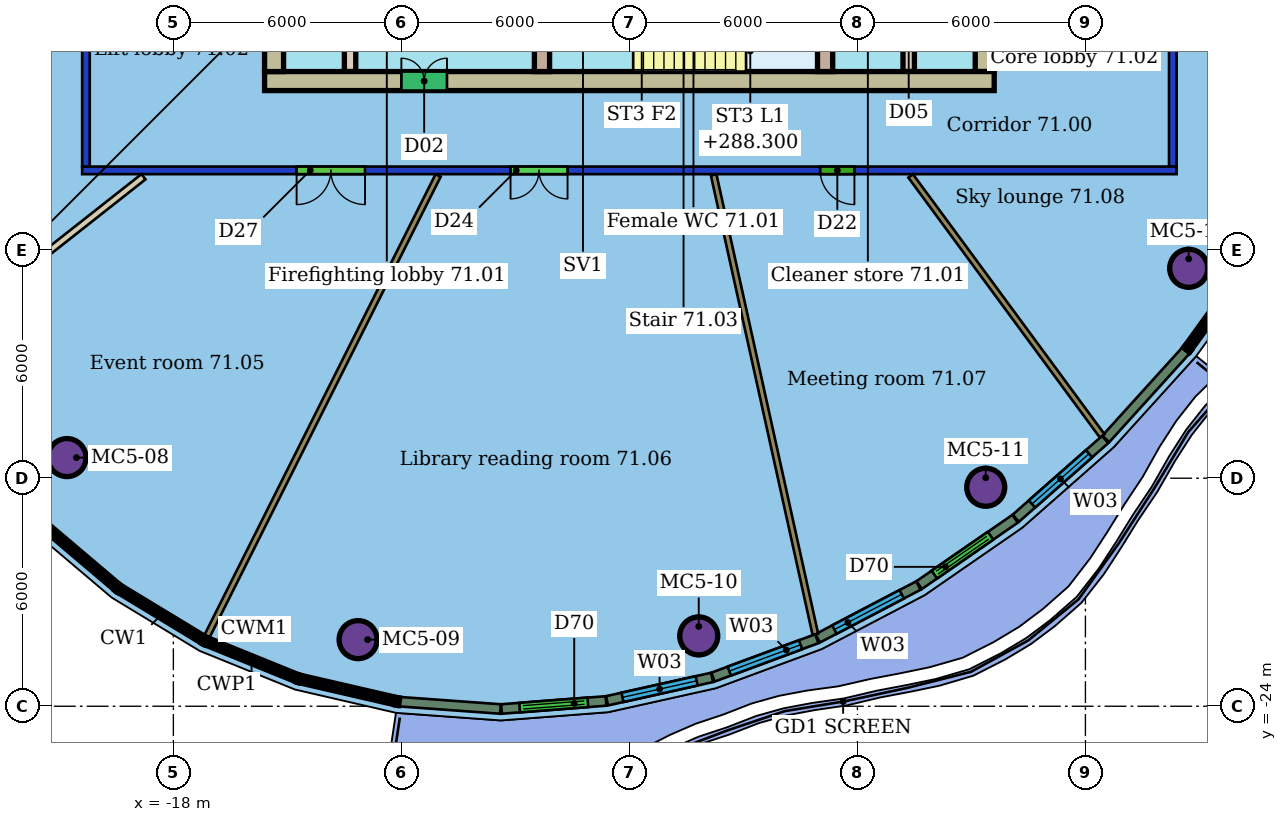
"""IFC4 building model, lengths in metres.
Left out: names, types, materials, properties, quantities, classifications, styles, units other than length and angle.
Written with IfcOpenShell. Run it as: python <this file> out.ifc"""

import sys

from ifc_helpers import new_model, si_unit, direction, frame, frame_2d, origin, origin_2d, place, context, subcontext, project, spatial, rectangle, hollow_circle, extrude, element, fill, save


model = new_model("IFC4")
c1 = context("Model", 3, precision=1e-05, world=origin(), true_north=direction((0.0, 1.0)))
c2 = subcontext(c1, "Body", "Model", "MODEL_VIEW")
j1 = project(units=[si_unit("LENGTHUNIT", "METRE"), si_unit("PLANEANGLEUNIT", "RADIAN")], contexts=[c1])
p1 = place(None, origin())
s1 = spatial("IfcSite", under=j1, at=p1, CompositionType="ELEMENT")
p2 = place(p1, origin())
s2 = spatial("IfcBuilding", under=s1, at=p2, CompositionType="ELEMENT")
p3 = place(p2, frame((0.0, 0.0, 286.5)))
s3 = spatial("IfcBuildingStorey", under=s2, at=p3, CompositionType="ELEMENT", Elevation=286.5)
for number, where, z_axis, x_axis in (
    (1, (-20.8, -17.457, 0.0), (0.0, 0.0, 1.0), (1.0, 0.0, 0.0)),
    (2, (-13.138, -22.247, 0.0), (0.0, 0.0, 1.0), (1.0, 0.0, 0.0)),
    (3, (-4.175, -22.149, 0.0), (0.0, 0.0, 1.0), (1.0, 0.0, 0.0)),
    (4, (3.377, -18.238, 0.0), (0.0, 0.0, 1.0), (1.0, 0.0, 0.0)),
    (5, (8.718, -12.477, 0.0), (0.0, 0.0, 1.0), (1.0, 0.0, 0.0)),
):
    element("IfcColumn", number, at=place(p3, frame(where, z_axis=z_axis, x_axis=x_axis)), inside=s3, PredefinedType="COLUMN", context=c2, shape_type="SweptSolid", body=[
        extrude(hollow_circle(Radius=0.5, WallThickness=0.04, at=origin_2d()), origin(), (0.0, 0.0, 1.0), 3.45),
    ])
p4 = place(p3, frame((8.4, -9.9, 0.0), z_axis=(0.0, 0.0, 1.0), x_axis=(-1.0, 0.0, 0.0)))
e6 = element("IfcWall", 6, at=p4, inside=s3, PredefinedType="PARTITIONING", context=c2, shape_type="SweptSolid", body=[
    extrude(rectangle(XDim=28.8, YDim=0.2, at=frame_2d((14.4, 0.0))), origin(), (0.0, 0.0, 1.0), 3.1),
])
p5 = place(p4, frame((21.356, 0.0, 0.0)))
e7 = element("IfcOpeningElement", 7, at=p5, cuts=e6, PredefinedType="OPENING", context=c2, shape_type="SweptSolid", body=[
    extrude(rectangle(XDim=1.8, YDim=2.4, at=frame_2d((0.9, 1.2))), frame((0.0, 0.11, 0.0), z_axis=(0.0, -1.0, 0.0), x_axis=(1.0, 0.0, 0.0)), (0.0, 0.0, 1.0), 0.22),
])
p6 = place(p4, frame((16.027, 0.0, 0.0)))
e8 = element("IfcOpeningElement", 8, at=p6, cuts=e6, PredefinedType="OPENING", context=c2, shape_type="SweptSolid", body=[
    extrude(rectangle(XDim=1.5, YDim=2.1, at=frame_2d((0.75, 1.05))), frame((0.0, 0.11, 0.0), z_axis=(0.0, -1.0, 0.0), x_axis=(1.0, 0.0, 0.0)), (0.0, 0.0, 1.0), 0.22),
])
p7 = place(p4, frame((8.479, 0.0, 0.0)))
e9 = element("IfcOpeningElement", 9, at=p7, cuts=e6, PredefinedType="OPENING", context=c2, shape_type="SweptSolid", body=[
    extrude(rectangle(XDim=0.9, YDim=2.1, at=frame_2d((0.45, 1.05))), frame((0.0, 0.11, 0.0), z_axis=(0.0, -1.0, 0.0), x_axis=(1.0, 0.0, 0.0)), (0.0, 0.0, 1.0), 0.22),
])
p8 = place(p3, frame((-20.3, -9.8, 0.0), z_axis=(0.0, 0.0, 1.0), x_axis=(0.0, 1.0, 0.0)))
e10 = element("IfcWall", 10, at=p8, inside=s3, PredefinedType="PARTITIONING", context=c2, shape_type="SweptSolid", body=[
    extrude(rectangle(XDim=19.6, YDim=0.2, at=frame_2d((9.8, 0.0))), origin(), (0.0, 0.0, 1.0), 3.1),
])
p9 = place(p8, frame((8.643, 0.0, 0.0)))
e11 = element("IfcOpeningElement", 11, at=p9, cuts=e10, PredefinedType="OPENING", context=c2, shape_type="SweptSolid", body=[
    extrude(rectangle(XDim=1.5, YDim=2.1, at=frame_2d((0.75, 1.05))), frame((0.0, 0.11, 0.0), z_axis=(0.0, -1.0, 0.0), x_axis=(1.0, 0.0, 0.0)), (0.0, 0.0, 1.0), 0.22),
])
p10 = place(p8, frame((4.379, 0.0, 0.0)))
e12 = element("IfcOpeningElement", 12, at=p10, cuts=e10, PredefinedType="OPENING", context=c2, shape_type="SweptSolid", body=[
    extrude(rectangle(XDim=1.0, YDim=2.1, at=frame_2d((0.5, 1.05))), frame((0.0, 0.11, 0.0), z_axis=(0.0, -1.0, 0.0), x_axis=(1.0, 0.0, 0.0)), (0.0, 0.0, 1.0), 0.22),
])
p11 = place(p3, frame((8.3, 9.8, 0.0), z_axis=(0.0, 0.0, 1.0), x_axis=(0.0, -1.0, 0.0)))
e13 = element("IfcWall", 13, at=p11, inside=s3, PredefinedType="PARTITIONING", context=c2, shape_type="SweptSolid", body=[
    extrude(rectangle(XDim=19.6, YDim=0.2, at=frame_2d((9.8, 0.0))), origin(), (0.0, 0.0, 1.0), 3.1),
])
p12 = place(p11, frame((14.011, 0.0, 0.0)))
e14 = element("IfcOpeningElement", 14, at=p12, cuts=e13, PredefinedType="OPENING", context=c2, shape_type="SweptSolid", body=[
    extrude(rectangle(XDim=1.5, YDim=2.1, at=frame_2d((0.75, 1.05))), frame((0.0, 0.11, 0.0), z_axis=(0.0, -1.0, 0.0), x_axis=(1.0, 0.0, 0.0)), (0.0, 0.0, 1.0), 0.22),
])
p13 = place(p11, frame((8.798, 0.0, 0.0)))
e15 = element("IfcOpeningElement", 15, at=p13, cuts=e13, PredefinedType="OPENING", context=c2, shape_type="SweptSolid", body=[
    extrude(rectangle(XDim=0.9, YDim=2.1, at=frame_2d((0.45, 1.05))), frame((0.0, 0.11, 0.0), z_axis=(0.0, -1.0, 0.0), x_axis=(1.0, 0.0, 0.0)), (0.0, 0.0, 1.0), 0.22),
])
p14 = place(p11, frame((5.084, 0.0, 0.0)))
e16 = element("IfcOpeningElement", 16, at=p14, cuts=e13, PredefinedType="OPENING", context=c2, shape_type="SweptSolid", body=[
    extrude(rectangle(XDim=1.5, YDim=2.4, at=frame_2d((0.75, 1.2))), frame((0.0, 0.11, 0.0), z_axis=(0.0, -1.0, 0.0), x_axis=(1.0, 0.0, 0.0)), (0.0, 0.0, 1.0), 0.22),
])
p15 = place(p11, frame((1.387, 0.0, 0.0)))
e17 = element("IfcOpeningElement", 17, at=p15, cuts=e13, PredefinedType="OPENING", context=c2, shape_type="SweptSolid", body=[
    extrude(rectangle(XDim=1.0, YDim=2.1, at=frame_2d((0.5, 1.05))), frame((0.0, 0.11, 0.0), z_axis=(0.0, -1.0, 0.0), x_axis=(1.0, 0.0, 0.0)), (0.0, 0.0, 1.0), 0.22),
])
p16 = place(p3, frame((-24.656, -14.689, 0.0), z_axis=(0.0, 0.0, 1.0), x_axis=(0.785692916709, 0.618616715449, 0.0)))
e18 = element("IfcWall", 18, at=p16, inside=s3, PredefinedType="PARTITIONING", context=c2, shape_type="SweptSolid", body=[
    extrude(rectangle(XDim=7.469, YDim=0.175, at=frame_2d((3.734, 0.0))), origin(), (0.0, 0.0, 1.0), 3.45),
])
p17 = place(p3, frame((-17.118, -22.163, 0.0), z_axis=(0.0, 0.0, 1.0), x_axis=(0.448386215015, 0.893839919776, 0.0)))
e19 = element("IfcWall", 19, at=p17, inside=s3, PredefinedType="PARTITIONING", context=c2, shape_type="SweptSolid", body=[
    extrude(rectangle(XDim=13.57, YDim=0.15, at=frame_2d((6.785, 0.0))), origin(), (0.0, 0.0, 1.0), 3.45),
])
p18 = place(p3, frame((-1.107, -22.105, 0.0), z_axis=(0.0, 0.0, 1.0), x_axis=(-0.216130755643, 0.976364428103, 0.0)))
e20 = element("IfcWall", 20, at=p18, inside=s3, PredefinedType="PARTITIONING", context=c2, shape_type="SweptSolid", body=[
    extrude(rectangle(XDim=12.382, YDim=0.15, at=frame_2d((6.191, 0.0))), origin(), (0.0, 0.0, 1.0), 3.45),
])
p19 = place(p3, frame((6.441, -16.886, 0.0), z_axis=(0.0, 0.0, 1.0), x_axis=(-0.593147094441, 0.805094109006, 0.0)))
e21 = element("IfcWall", 21, at=p19, inside=s3, PredefinedType="PARTITIONING", context=c2, shape_type="SweptSolid", body=[
    extrude(rectangle(XDim=8.498, YDim=0.15, at=frame_2d((4.249, 0.0))), origin(), (0.0, 0.0, 1.0), 3.45),
])
p20 = place(p3, frame((-12.043, -23.881, 0.0), z_axis=(0.0, 0.0, 1.0), x_axis=(0.997395344453, -0.072128544025, 0.0)))
e22 = element("IfcWall", 22, at=p20, inside=s3, PredefinedType="SOLIDWALL", context=c2, shape_type="SweptSolid", body=[
    extrude(rectangle(XDim=2.657, YDim=0.25, at=frame_2d((1.329, 0.0))), origin(), (0.0, 0.0, 1.0), 3.15),
])
p21 = place(p3, frame((-9.366, -24.073, 0.0), z_axis=(0.0, 0.0, 1.0), x_axis=(0.997054485502, 0.076696498885, 0.0)))
e23 = element("IfcWall", 23, at=p21, inside=s3, PredefinedType="SOLIDWALL", context=c2, shape_type="SweptSolid", body=[
    extrude(rectangle(XDim=2.76, YDim=0.25, at=frame_2d((1.38, 0.0))), origin(), (0.0, 0.0, 1.0), 3.15),
])
p22 = place(p21, frame((0.48, 0.0, 0.0)))
e24 = element("IfcOpeningElement", 24, at=p22, cuts=e23, PredefinedType="OPENING", context=c2, shape_type="SweptSolid", body=[
    extrude(rectangle(XDim=1.8, YDim=2.4, at=frame_2d((0.9, 1.2))), frame((0.0, 0.135, 0.0), z_axis=(0.0, -1.0, 0.0), x_axis=(1.0, 0.0, 0.0)), (0.0, 0.0, 1.0), 0.27),
])
p23 = place(p3, frame((-6.589, -23.857, 0.0), z_axis=(0.0, 0.0, 1.0), x_axis=(0.976083550613, 0.217395727242, 0.0)))
e25 = element("IfcWall", 25, at=p23, inside=s3, PredefinedType="SOLIDWALL", context=c2, shape_type="SweptSolid", body=[
    extrude(rectangle(XDim=2.833, YDim=0.25, at=frame_2d((1.417, 0.0))), origin(), (0.0, 0.0, 1.0), 3.15),
])
p24 = place(p23, frame((0.417, 0.0, 0.9)))
e26 = element("IfcOpeningElement", 26, at=p24, cuts=e25, PredefinedType="OPENING", context=c2, shape_type="SweptSolid", body=[
    extrude(rectangle(XDim=2.0, YDim=2.1, at=frame_2d((1.0, 1.05))), frame((0.0, 0.135, 0.0), z_axis=(0.0, -1.0, 0.0), x_axis=(1.0, 0.0, 0.0)), (0.0, 0.0, 1.0), 0.27),
])
p25 = place(p3, frame((-3.799, -23.234, 0.0), z_axis=(0.0, 0.0, 1.0), x_axis=(0.937870025434, 0.346986765442, 0.0)))
e27 = element("IfcWall", 27, at=p25, inside=s3, PredefinedType="SOLIDWALL", context=c2, shape_type="SweptSolid", body=[
    extrude(rectangle(XDim=2.913, YDim=0.25, at=frame_2d((1.457, 0.0))), origin(), (0.0, 0.0, 1.0), 3.15),
])
p26 = place(p25, frame((0.457, 0.0, 0.9)))
e28 = element("IfcOpeningElement", 28, at=p26, cuts=e27, PredefinedType="OPENING", context=c2, shape_type="SweptSolid", body=[
    extrude(rectangle(XDim=2.0, YDim=2.1, at=frame_2d((1.0, 1.05))), frame((0.0, 0.135, 0.0), z_axis=(0.0, -1.0, 0.0), x_axis=(1.0, 0.0, 0.0)), (0.0, 0.0, 1.0), 0.27),
])
p27 = place(p3, frame((-1.045, -22.214, 0.0), z_axis=(0.0, 0.0, 1.0), x_axis=(0.885698994615, 0.464259938977, 0.0)))
e29 = element("IfcWall", 29, at=p27, inside=s3, PredefinedType="SOLIDWALL", context=c2, shape_type="SweptSolid", body=[
    extrude(rectangle(XDim=2.993, YDim=0.25, at=frame_2d((1.497, 0.0))), origin(), (0.0, 0.0, 1.0), 3.15),
])
p28 = place(p27, frame((0.497, 0.0, 0.9)))
e30 = element("IfcOpeningElement", 30, at=p28, cuts=e29, PredefinedType="OPENING", context=c2, shape_type="SweptSolid", body=[
    extrude(rectangle(XDim=2.0, YDim=2.1, at=frame_2d((1.0, 1.05))), frame((0.0, 0.135, 0.0), z_axis=(0.0, -1.0, 0.0), x_axis=(1.0, 0.0, 0.0)), (0.0, 0.0, 1.0), 0.27),
])
p29 = place(p3, frame((1.625, -20.812, 0.0), z_axis=(0.0, 0.0, 1.0), x_axis=(0.822592980817, 0.568630625196, 0.0)))
e31 = element("IfcWall", 31, at=p29, inside=s3, PredefinedType="SOLIDWALL", context=c2, shape_type="SweptSolid", body=[
    extrude(rectangle(XDim=3.069, YDim=0.25, at=frame_2d((1.534, 0.0))), origin(), (0.0, 0.0, 1.0), 3.15),
])
p30 = place(p29, frame((0.484, 0.0, 0.0)))
e32 = element("IfcOpeningElement", 32, at=p30, cuts=e31, PredefinedType="OPENING", context=c2, shape_type="SweptSolid", body=[
    extrude(rectangle(XDim=1.8, YDim=2.4, at=frame_2d((0.9, 1.2))), frame((0.0, 0.135, 0.0), z_axis=(0.0, -1.0, 0.0), x_axis=(1.0, 0.0, 0.0)), (0.0, 0.0, 1.0), 0.27),
])
p31 = place(p3, frame((4.167, -19.053, 0.0), z_axis=(0.0, 0.0, 1.0), x_axis=(0.750580626187, 0.660778876473, 0.0)))
e33 = element("IfcWall", 33, at=p31, inside=s3, PredefinedType="SOLIDWALL", context=c2, shape_type="SweptSolid", body=[
    extrude(rectangle(XDim=3.135, YDim=0.25, at=frame_2d((1.567, 0.0))), origin(), (0.0, 0.0, 1.0), 3.15),
])
p32 = place(p31, frame((0.567, 0.0, 0.9)))
e34 = element("IfcOpeningElement", 34, at=p32, cuts=e33, PredefinedType="OPENING", context=c2, shape_type="SweptSolid", body=[
    extrude(rectangle(XDim=2.0, YDim=2.1, at=frame_2d((1.0, 1.05))), frame((0.0, 0.135, 0.0), z_axis=(0.0, -1.0, 0.0), x_axis=(1.0, 0.0, 0.0)), (0.0, 0.0, 1.0), 0.27),
])
p33 = place(p3, frame((6.536, -16.967, 0.0), z_axis=(0.0, 0.0, 1.0), x_axis=(0.671535416704, 0.740972458403, 0.0)))
e35 = element("IfcWall", 35, at=p33, inside=s3, PredefinedType="SOLIDWALL", context=c2, shape_type="SweptSolid", body=[
    extrude(rectangle(XDim=3.143, YDim=0.25, at=frame_2d((1.572, 0.0))), origin(), (0.0, 0.0, 1.0), 3.15),
])
p34 = place(p3, frame((-15.6, -7.55, 0.0), z_axis=(0.0, 0.0, 1.0), x_axis=(1.0, 0.0, 0.0)))
e36 = element("IfcWall", 36, at=p34, inside=s3, PredefinedType="SHEAR", context=c2, shape_type="SweptSolid", body=[
    extrude(rectangle(XDim=19.2, YDim=0.5, at=frame_2d((9.6, 0.0))), origin(), (0.0, 0.0, 1.0), 3.3),
])
p35 = place(p34, frame((3.6, 0.0, 0.0)))
e37 = element("IfcOpeningElement", 37, at=p35, cuts=e36, PredefinedType="OPENING", context=c2, shape_type="SweptSolid", body=[
    extrude(rectangle(XDim=1.2, YDim=2.1, at=frame_2d((0.6, 1.05))), frame((0.0, 0.26, 0.0), z_axis=(0.0, -1.0, 0.0), x_axis=(1.0, 0.0, 0.0)), (0.0, 0.0, 1.0), 0.52),
])
p36 = place(p3, frame((-15.35, 7.3, 0.0), z_axis=(0.0, 0.0, 1.0), x_axis=(0.0, -1.0, 0.0)))
e38 = element("IfcWall", 38, at=p36, inside=s3, PredefinedType="SHEAR", context=c2, shape_type="SweptSolid", body=[
    extrude(rectangle(XDim=14.6, YDim=0.5, at=frame_2d((7.3, 0.0))), origin(), (0.0, 0.0, 1.0), 3.3),
])
p37 = place(p36, frame((10.6, 0.0, 0.0)))
e39 = element("IfcOpeningElement", 39, at=p37, cuts=e38, PredefinedType="OPENING", context=c2, shape_type="SweptSolid", body=[
    extrude(rectangle(XDim=1.2, YDim=2.1, at=frame_2d((0.6, 1.05))), frame((0.0, 0.26, 0.0), z_axis=(0.0, -1.0, 0.0), x_axis=(1.0, 0.0, 0.0)), (0.0, 0.0, 1.0), 0.52),
])
p38 = place(p36, frame((2.8, 0.0, 0.0)))
e40 = element("IfcOpeningElement", 40, at=p38, cuts=e38, PredefinedType="OPENING", context=c2, shape_type="SweptSolid", body=[
    extrude(rectangle(XDim=1.2, YDim=2.1, at=frame_2d((0.6, 1.05))), frame((0.0, 0.26, 0.0), z_axis=(0.0, -1.0, 0.0), x_axis=(1.0, 0.0, 0.0)), (0.0, 0.0, 1.0), 0.52),
])
p39 = place(p3, frame((3.35, -7.3, 0.0), z_axis=(0.0, 0.0, 1.0), x_axis=(0.0, 1.0, 0.0)))
e41 = element("IfcWall", 41, at=p39, inside=s3, PredefinedType="SHEAR", context=c2, shape_type="SweptSolid", body=[
    extrude(rectangle(XDim=14.6, YDim=0.5, at=frame_2d((7.3, 0.0))), origin(), (0.0, 0.0, 1.0), 3.3),
])
p40 = place(p39, frame((2.8, 0.0, 0.0)))
e42 = element("IfcOpeningElement", 42, at=p40, cuts=e41, PredefinedType="OPENING", context=c2, shape_type="SweptSolid", body=[
    extrude(rectangle(XDim=1.2, YDim=2.1, at=frame_2d((0.6, 1.05))), frame((0.0, 0.26, 0.0), z_axis=(0.0, -1.0, 0.0), x_axis=(1.0, 0.0, 0.0)), (0.0, 0.0, 1.0), 0.52),
])
p41 = place(p39, frame((10.6, 0.0, 0.0)))
e43 = element("IfcOpeningElement", 43, at=p41, cuts=e41, PredefinedType="OPENING", context=c2, shape_type="SweptSolid", body=[
    extrude(rectangle(XDim=1.2, YDim=2.1, at=frame_2d((0.6, 1.05))), frame((0.0, 0.26, 0.0), z_axis=(0.0, -1.0, 0.0), x_axis=(1.0, 0.0, 0.0)), (0.0, 0.0, 1.0), 0.52),
])
p42 = place(p3, frame((-13.35, 7.3, 0.0), z_axis=(0.0, 0.0, 1.0), x_axis=(0.0, -1.0, 0.0)))
e44 = element("IfcWall", 44, at=p42, inside=s3, PredefinedType="SHEAR", context=c2, shape_type="SweptSolid", body=[
    extrude(rectangle(XDim=14.6, YDim=0.3, at=frame_2d((7.3, 0.0))), origin(), (0.0, 0.0, 1.0), 3.3),
])
p43 = place(p42, frame((6.55, 0.0, 0.0)))
e45 = element("IfcOpeningElement", 45, at=p43, cuts=e44, PredefinedType="OPENING", context=c2, shape_type="SweptSolid", body=[
    extrude(rectangle(XDim=1.5, YDim=2.1, at=frame_2d((0.75, 1.05))), frame((0.0, 0.16, 0.0), z_axis=(0.0, -1.0, 0.0), x_axis=(1.0, 0.0, 0.0)), (0.0, 0.0, 1.0), 0.32),
])
p44 = place(p3, frame((1.35, -7.3, 0.0), z_axis=(0.0, 0.0, 1.0), x_axis=(0.0, 1.0, 0.0)))
e46 = element("IfcWall", 46, at=p44, inside=s3, PredefinedType="SHEAR", context=c2, shape_type="SweptSolid", body=[
    extrude(rectangle(XDim=14.6, YDim=0.3, at=frame_2d((7.3, 0.0))), origin(), (0.0, 0.0, 1.0), 3.3),
])
p45 = place(p44, frame((1.21, 0.0, 0.0)))
e47 = element("IfcOpeningElement", 47, at=p45, cuts=e46, PredefinedType="OPENING", context=c2, shape_type="SweptSolid", body=[
    extrude(rectangle(XDim=1.0, YDim=2.1, at=frame_2d((0.5, 1.05))), frame((0.0, 0.16, 0.0), z_axis=(0.0, -1.0, 0.0), x_axis=(1.0, 0.0, 0.0)), (0.0, 0.0, 1.0), 0.32),
])
p46 = place(p44, frame((6.55, 0.0, 0.0)))
e48 = element("IfcOpeningElement", 48, at=p46, cuts=e46, PredefinedType="OPENING", context=c2, shape_type="SweptSolid", body=[
    extrude(rectangle(XDim=1.5, YDim=2.1, at=frame_2d((0.75, 1.05))), frame((0.0, 0.16, 0.0), z_axis=(0.0, -1.0, 0.0), x_axis=(1.0, 0.0, 0.0)), (0.0, 0.0, 1.0), 0.32),
])
p47 = place(p3, frame((-8.3, -3.88, 0.0), z_axis=(0.0, 0.0, 1.0), x_axis=(0.0, -1.0, 0.0)))
e49 = element("IfcWall", 49, at=p47, inside=s3, PredefinedType="SHEAR", context=c2, shape_type="SweptSolid", body=[
    extrude(rectangle(XDim=3.42, YDim=0.4, at=frame_2d((1.71, 0.0))), origin(), (0.0, 0.0, 1.0), 3.3),
])
p48 = place(p47, frame((1.11, 0.0, 0.0)))
e50 = element("IfcOpeningElement", 50, at=p48, cuts=e49, PredefinedType="OPENING", context=c2, shape_type="SweptSolid", body=[
    extrude(rectangle(XDim=1.2, YDim=2.1, at=frame_2d((0.6, 1.05))), frame((0.0, 0.21, 0.0), z_axis=(0.0, -1.0, 0.0), x_axis=(1.0, 0.0, 0.0)), (0.0, 0.0, 1.0), 0.42),
])
p49 = place(p3, frame((-0.85, -3.88, 0.0), z_axis=(0.0, 0.0, 1.0), x_axis=(0.0, -1.0, 0.0)))
e51 = element("IfcWall", 51, at=p49, inside=s3, PredefinedType="SHEAR", context=c2, shape_type="SweptSolid", body=[
    extrude(rectangle(XDim=3.42, YDim=0.4, at=frame_2d((1.71, 0.0))), origin(), (0.0, 0.0, 1.0), 3.3),
])
p50 = place(p5, origin())
e52 = element("IfcDoor", 52, at=p50, inside=s3, OperationType="DOUBLE_DOOR_SINGLE_SWING", PredefinedType="DOOR", context=c2, shape_type="SweptSolid", body=[
    extrude(rectangle(XDim=1.8, YDim=2.4, at=frame_2d((0.9, 1.2))), frame((0.0, 0.025, 0.0), z_axis=(0.0, -1.0, 0.0), x_axis=(1.0, 0.0, 0.0)), (0.0, 0.0, 1.0), 0.05),
])
fill(e7, e52)
p51 = place(p6, origin())
e53 = element("IfcDoor", 53, at=p51, inside=s3, OperationType="DOUBLE_DOOR_SINGLE_SWING", PredefinedType="DOOR", context=c2, shape_type="SweptSolid", body=[
    extrude(rectangle(XDim=1.5, YDim=2.1, at=frame_2d((0.75, 1.05))), frame((0.0, 0.025, 0.0), z_axis=(0.0, -1.0, 0.0), x_axis=(1.0, 0.0, 0.0)), (0.0, 0.0, 1.0), 0.05),
])
fill(e8, e53)
p52 = place(p7, origin())
e54 = element("IfcDoor", 54, at=p52, inside=s3, OperationType="SINGLE_SWING_LEFT", PredefinedType="DOOR", context=c2, shape_type="SweptSolid", body=[
    extrude(rectangle(XDim=0.9, YDim=2.1, at=frame_2d((0.45, 1.05))), frame((0.0, 0.025, 0.0), z_axis=(0.0, -1.0, 0.0), x_axis=(1.0, 0.0, 0.0)), (0.0, 0.0, 1.0), 0.05),
])
fill(e9, e54)
p53 = place(p22, origin())
e55 = element("IfcDoor", 55, at=p53, inside=s3, OperationType="DOUBLE_DOOR_SLIDING", PredefinedType="DOOR", context=c2, shape_type="SweptSolid", body=[
    extrude(rectangle(XDim=1.8, YDim=2.4, at=frame_2d((0.9, 1.2))), frame((0.0, 0.025, 0.0), z_axis=(0.0, -1.0, 0.0), x_axis=(1.0, 0.0, 0.0)), (0.0, 0.0, 1.0), 0.05),
])
fill(e24, e55)
p54 = place(p24, origin())
e56 = element("IfcWindow", 56, at=p54, inside=s3, PartitioningType="SINGLE_PANEL", PredefinedType="WINDOW", context=c2, shape_type="SweptSolid", body=[
    extrude(rectangle(XDim=2.0, YDim=2.1, at=frame_2d((1.0, 1.05))), frame((0.0, 0.03, 0.0), z_axis=(0.0, -1.0, 0.0), x_axis=(1.0, 0.0, 0.0)), (0.0, 0.0, 1.0), 0.06),
])
fill(e26, e56)
p55 = place(p26, origin())
e57 = element("IfcWindow", 57, at=p55, inside=s3, PartitioningType="SINGLE_PANEL", PredefinedType="WINDOW", context=c2, shape_type="SweptSolid", body=[
    extrude(rectangle(XDim=2.0, YDim=2.1, at=frame_2d((1.0, 1.05))), frame((0.0, 0.03, 0.0), z_axis=(0.0, -1.0, 0.0), x_axis=(1.0, 0.0, 0.0)), (0.0, 0.0, 1.0), 0.06),
])
fill(e28, e57)
p56 = place(p28, origin())
e58 = element("IfcWindow", 58, at=p56, inside=s3, PartitioningType="SINGLE_PANEL", PredefinedType="WINDOW", context=c2, shape_type="SweptSolid", body=[
    extrude(rectangle(XDim=2.0, YDim=2.1, at=frame_2d((1.0, 1.05))), frame((0.0, 0.03, 0.0), z_axis=(0.0, -1.0, 0.0), x_axis=(1.0, 0.0, 0.0)), (0.0, 0.0, 1.0), 0.06),
])
fill(e30, e58)
p57 = place(p30, origin())
e59 = element("IfcDoor", 59, at=p57, inside=s3, OperationType="DOUBLE_DOOR_SLIDING", PredefinedType="DOOR", context=c2, shape_type="SweptSolid", body=[
    extrude(rectangle(XDim=1.8, YDim=2.4, at=frame_2d((0.9, 1.2))), frame((0.0, 0.025, 0.0), z_axis=(0.0, -1.0, 0.0), x_axis=(1.0, 0.0, 0.0)), (0.0, 0.0, 1.0), 0.05),
])
fill(e32, e59)
p58 = place(p32, origin())
e60 = element("IfcWindow", 60, at=p58, inside=s3, PartitioningType="SINGLE_PANEL", PredefinedType="WINDOW", context=c2, shape_type="SweptSolid", body=[
    extrude(rectangle(XDim=2.0, YDim=2.1, at=frame_2d((1.0, 1.05))), frame((0.0, 0.03, 0.0), z_axis=(0.0, -1.0, 0.0), x_axis=(1.0, 0.0, 0.0)), (0.0, 0.0, 1.0), 0.06),
])
fill(e34, e60)
p59 = place(p35, origin())
e61 = element("IfcDoor", 61, at=p59, inside=s3, OperationType="DOUBLE_DOOR_SINGLE_SWING", PredefinedType="NOTDEFINED", context=c2, shape_type="SweptSolid", body=[
    extrude(rectangle(XDim=1.2, YDim=2.1, at=frame_2d((0.6, 1.05))), frame((0.0, 0.025, 0.0), z_axis=(0.0, -1.0, 0.0), x_axis=(1.0, 0.0, 0.0)), (0.0, 0.0, 1.0), 0.05),
])
fill(e37, e61)
save(model, sys.argv[1])
